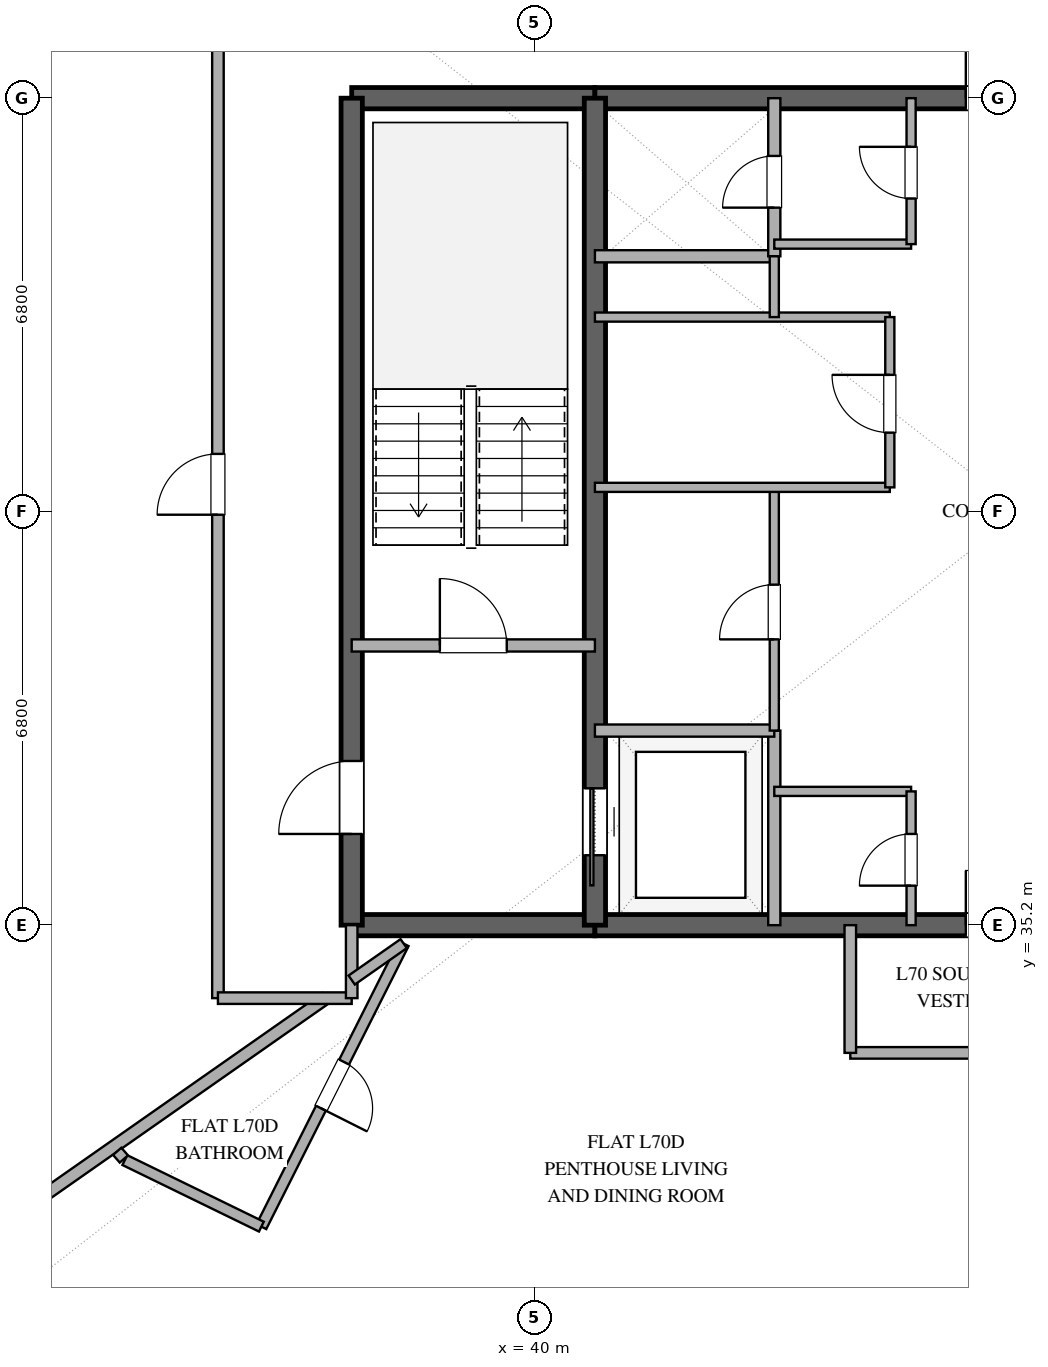
"""IFC4 building model, lengths in metres.
Left out: names, types, materials, properties, quantities, classifications, styles, units other than length and angle.
Written with IfcOpenShell. Run it as: python <this file> out.ifc"""

import sys

from ifc_helpers import new_model, si_unit, direction, frame, frame_2d, origin, place, context, subcontext, project, spatial, rectangle, extrude, element, fill, save


model = new_model("IFC4")
c1 = context("Model", 3, precision=1e-05, world=origin(), true_north=direction((0.0, 1.0)))
c2 = subcontext(c1, "Body", "Model", "MODEL_VIEW")
j1 = project(units=[si_unit("LENGTHUNIT", "METRE"), si_unit("PLANEANGLEUNIT", "RADIAN")], contexts=[c1])
p1 = place(None, origin())
s1 = spatial("IfcSite", under=j1, at=p1, CompositionType="ELEMENT")
p2 = place(p1, origin())
s2 = spatial("IfcBuilding", under=s1, at=p2, CompositionType="ELEMENT")
p3 = place(p2, frame((0.0, 0.0, 273.0)))
s3 = spatial("IfcBuildingStorey", under=s2, at=p3, CompositionType="ELEMENT", Elevation=273.0)
p4 = place(p3, frame((37.0, 35.2, 0.0), z_axis=(0.0, 0.0, 1.0), x_axis=(1.0, 0.0, 0.0)))
e1 = element("IfcWall", 1, at=p4, inside=s3, PredefinedType="SHEAR", context=c2, shape_type="SweptSolid", body=[
    extrude(rectangle(XDim=4.0, YDim=0.35, at=frame_2d((2.0, 0.0))), origin(), (0.0, 0.0, 1.0), 3.37),
])
p5 = place(p3, frame((41.0, 35.2, 0.0), z_axis=(0.0, 0.0, 1.0), x_axis=(1.0, 0.0, 0.0)))
e2 = element("IfcWall", 2, at=p5, inside=s3, PredefinedType="SHEAR", context=c2, shape_type="SweptSolid", body=[
    extrude(rectangle(XDim=14.0, YDim=0.35, at=frame_2d((7.0, 0.0))), origin(), (0.0, 0.0, 1.0), 3.37),
])
p6 = place(p5, frame((6.1, 0.0, 0.0)))
e3 = element("IfcOpeningElement", 3, at=p6, cuts=e2, PredefinedType="OPENING", context=c2, shape_type="SweptSolid", body=[
    extrude(rectangle(XDim=1.8, YDim=2.25, at=frame_2d((0.9, 1.125))), frame((0.0, 0.185, 0.0), z_axis=(0.0, -1.0, 0.0), x_axis=(1.0, 0.0, 0.0)), (0.0, 0.0, 1.0), 0.37),
])
p7 = place(p3, frame((37.0, 48.8, 0.0), z_axis=(0.0, 0.0, 1.0), x_axis=(1.0, 0.0, 0.0)))
e4 = element("IfcWall", 4, at=p7, inside=s3, PredefinedType="SHEAR", context=c2, shape_type="SweptSolid", body=[
    extrude(rectangle(XDim=4.0, YDim=0.35, at=frame_2d((2.0, 0.0))), origin(), (0.0, 0.0, 1.0), 3.37),
])
p8 = place(p3, frame((41.0, 48.8, 0.0), z_axis=(0.0, 0.0, 1.0), x_axis=(1.0, 0.0, 0.0)))
e5 = element("IfcWall", 5, at=p8, inside=s3, PredefinedType="SHEAR", context=c2, shape_type="SweptSolid", body=[
    extrude(rectangle(XDim=14.0, YDim=0.35, at=frame_2d((7.0, 0.0))), origin(), (0.0, 0.0, 1.0), 3.37),
])
p9 = place(p8, frame((6.1, 0.0, 0.0)))
e6 = element("IfcOpeningElement", 6, at=p9, cuts=e5, PredefinedType="OPENING", context=c2, shape_type="SweptSolid", body=[
    extrude(rectangle(XDim=1.8, YDim=2.25, at=frame_2d((0.9, 1.125))), frame((0.0, 0.185, 0.0), z_axis=(0.0, -1.0, 0.0), x_axis=(1.0, 0.0, 0.0)), (0.0, 0.0, 1.0), 0.37),
])
p10 = place(p3, frame((37.0, 35.2, 0.0), z_axis=(0.0, 0.0, 1.0), x_axis=(0.0, 1.0, 0.0)))
e7 = element("IfcWall", 7, at=p10, inside=s3, PredefinedType="SHEAR", context=c2, shape_type="SweptSolid", body=[
    extrude(rectangle(XDim=13.6, YDim=0.35, at=frame_2d((6.8, 0.0))), origin(), (0.0, 0.0, 1.0), 3.37),
])
p11 = place(p10, frame((1.5, 0.0, 0.0)))
e8 = element("IfcOpeningElement", 8, at=p11, cuts=e7, PredefinedType="OPENING", context=c2, shape_type="SweptSolid", body=[
    extrude(rectangle(XDim=1.2, YDim=2.15, at=frame_2d((0.6, 1.075))), frame((0.0, 0.185, 0.0), z_axis=(0.0, -1.0, 0.0), x_axis=(1.0, 0.0, 0.0)), (0.0, 0.0, 1.0), 0.37),
])
p12 = place(p3, frame((41.0, 35.2, 0.0), z_axis=(0.0, 0.0, 1.0), x_axis=(0.0, 1.0, 0.0)))
e9 = element("IfcWall", 9, at=p12, inside=s3, PredefinedType="SHEAR", context=c2, shape_type="SweptSolid", body=[
    extrude(rectangle(XDim=13.6, YDim=0.35, at=frame_2d((6.8, 0.0))), origin(), (0.0, 0.0, 1.0), 3.37),
])
p13 = place(p12, frame((1.15, 0.0, 0.0)))
e10 = element("IfcOpeningElement", 10, at=p13, cuts=e9, PredefinedType="OPENING", context=c2, shape_type="SweptSolid", body=[
    extrude(rectangle(XDim=1.1, YDim=2.2, at=frame_2d((0.55, 1.1))), frame((0.0, 0.185, 0.0), z_axis=(0.0, -1.0, 0.0), x_axis=(1.0, 0.0, 0.0)), (0.0, 0.0, 1.0), 0.37),
])
p14 = place(p3, frame((37.0, 39.8, 0.0), z_axis=(0.0, 0.0, 1.0), x_axis=(1.0, 0.0, 0.0)))
e11 = element("IfcWall", 11, at=p14, inside=s3, PredefinedType="SOLIDWALL", context=c2, shape_type="SweptSolid", body=[
    extrude(rectangle(XDim=4.0, YDim=0.2, at=frame_2d((2.0, 0.0))), origin(), (0.0, 0.0, 1.0), 2.73),
])
p15 = place(p14, frame((1.45, 0.0, 0.0)))
e12 = element("IfcOpeningElement", 12, at=p15, cuts=e11, PredefinedType="OPENING", context=c2, shape_type="SweptSolid", body=[
    extrude(rectangle(XDim=1.1, YDim=2.15, at=frame_2d((0.55, 1.075))), frame((0.0, 0.11, 0.0), z_axis=(0.0, -1.0, 0.0), x_axis=(1.0, 0.0, 0.0)), (0.0, 0.0, 1.0), 0.22),
])
p16 = place(p3, frame((43.95, 35.2, 0.0), z_axis=(0.0, 0.0, 1.0), x_axis=(0.0, 1.0, 0.0)))
e13 = element("IfcWall", 13, at=p16, inside=s3, PredefinedType="SOLIDWALL", context=c2, shape_type="SweptSolid", body=[
    extrude(rectangle(XDim=3.2, YDim=0.2, at=frame_2d((1.6, 0.0))), origin(), (0.0, 0.0, 1.0), 2.73),
])
for number, where, z_axis, x_axis in (
    (14, (41.0, 38.4, 0.0), (0.0, 0.0, 1.0), (1.0, 0.0, 0.0)),
    (15, (41.0, 46.2, 0.0), (0.0, 0.0, 1.0), (1.0, 0.0, 0.0)),
):
    element("IfcWall", number, at=place(p3, frame(where, z_axis=z_axis, x_axis=x_axis)), inside=s3, PredefinedType="SOLIDWALL", context=c2, shape_type="SweptSolid", body=[
        extrude(rectangle(XDim=2.95, YDim=0.2, at=frame_2d((1.475, 0.0))), origin(), (0.0, 0.0, 1.0), 2.73),
    ])
p17 = place(p3, frame((43.95, 46.2, 0.0), z_axis=(0.0, 0.0, 1.0), x_axis=(0.0, 1.0, 0.0)))
e16 = element("IfcWall", 16, at=p17, inside=s3, PredefinedType="SOLIDWALL", context=c2, shape_type="SweptSolid", body=[
    extrude(rectangle(XDim=2.6, YDim=0.2, at=frame_2d((1.3, 0.0))), origin(), (0.0, 0.0, 1.0), 2.73),
])
p18 = place(p17, frame((0.8, 0.0, 0.0)))
e17 = element("IfcOpeningElement", 17, at=p18, cuts=e16, PredefinedType="OPENING", context=c2, shape_type="SweptSolid", body=[
    extrude(rectangle(XDim=0.85, YDim=2.15, at=frame_2d((0.425, 1.075))), frame((0.0, 0.11, 0.0), z_axis=(0.0, -1.0, 0.0), x_axis=(1.0, 0.0, 0.0)), (0.0, 0.0, 1.0), 0.22),
])
p19 = place(p3, frame((43.95, 38.4, 0.0), z_axis=(0.0, 0.0, 1.0), x_axis=(0.0, 1.0, 0.0)))
e18 = element("IfcWall", 18, at=p19, inside=s3, PredefinedType="PARTITIONING", context=c2, shape_type="SweptSolid", body=[
    extrude(rectangle(XDim=4.0, YDim=0.15, at=frame_2d((2.0, 0.0))), origin(), (0.0, 0.0, 1.0), 2.73),
])
p20 = place(p19, frame((1.5, 0.0, 0.0)))
e19 = element("IfcOpeningElement", 19, at=p20, cuts=e18, PredefinedType="OPENING", context=c2, shape_type="SweptSolid", body=[
    extrude(rectangle(XDim=0.9, YDim=2.15, at=frame_2d((0.45, 1.075))), frame((0.0, 0.085, 0.0), z_axis=(0.0, -1.0, 0.0), x_axis=(1.0, 0.0, 0.0)), (0.0, 0.0, 1.0), 0.17),
])
for number, where, z_axis, x_axis in (
    (20, (41.0, 42.4, 0.0), (0.0, 0.0, 1.0), (1.0, 0.0, 0.0)),
    (21, (41.0, 45.2, 0.0), (0.0, 0.0, 1.0), (1.0, 0.0, 0.0)),
):
    element("IfcWall", number, at=place(p3, frame(where, z_axis=z_axis, x_axis=x_axis)), inside=s3, PredefinedType="PARTITIONING", context=c2, shape_type="SweptSolid", body=[
        extrude(rectangle(XDim=4.85, YDim=0.15, at=frame_2d((2.425, 0.0))), origin(), (0.0, 0.0, 1.0), 2.73),
    ])
p21 = place(p3, frame((43.95, 45.2, 0.0), z_axis=(0.0, 0.0, 1.0), x_axis=(0.0, 1.0, 0.0)))
e22 = element("IfcWall", 22, at=p21, inside=s3, PredefinedType="PARTITIONING", context=c2, shape_type="SweptSolid", body=[
    extrude(rectangle(XDim=1.0, YDim=0.15, at=frame_2d((0.5, 0.0))), origin(), (0.0, 0.0, 1.0), 2.73),
])
p22 = place(p3, frame((45.85, 42.4, 0.0), z_axis=(0.0, 0.0, 1.0), x_axis=(0.0, 1.0, 0.0)))
e23 = element("IfcWall", 23, at=p22, inside=s3, PredefinedType="PARTITIONING", context=c2, shape_type="SweptSolid", body=[
    extrude(rectangle(XDim=2.8, YDim=0.15, at=frame_2d((1.4, 0.0))), origin(), (0.0, 0.0, 1.0), 2.73),
])
p23 = place(p22, frame((0.9, 0.0, 0.0)))
e24 = element("IfcOpeningElement", 24, at=p23, cuts=e23, PredefinedType="OPENING", context=c2, shape_type="SweptSolid", body=[
    extrude(rectangle(XDim=0.95, YDim=2.15, at=frame_2d((0.475, 1.075))), frame((0.0, 0.085, 0.0), z_axis=(0.0, -1.0, 0.0), x_axis=(1.0, 0.0, 0.0)), (0.0, 0.0, 1.0), 0.17),
])
p24 = place(p3, frame((43.95, 37.4, 0.0), z_axis=(0.0, 0.0, 1.0), x_axis=(1.0, 0.0, 0.0)))
e25 = element("IfcWall", 25, at=p24, inside=s3, PredefinedType="PARTITIONING", context=c2, shape_type="SweptSolid", body=[
    extrude(rectangle(XDim=2.25, YDim=0.15, at=frame_2d((1.125, 0.0))), origin(), (0.0, 0.0, 1.0), 2.73),
])
p25 = place(p3, frame((46.2, 35.2, 0.0), z_axis=(0.0, 0.0, 1.0), x_axis=(0.0, 1.0, 0.0)))
e26 = element("IfcWall", 26, at=p25, inside=s3, PredefinedType="PARTITIONING", context=c2, shape_type="SweptSolid", body=[
    extrude(rectangle(XDim=2.2, YDim=0.15, at=frame_2d((1.1, 0.0))), origin(), (0.0, 0.0, 1.0), 2.73),
])
p26 = place(p25, frame((0.65, 0.0, 0.0)))
e27 = element("IfcOpeningElement", 27, at=p26, cuts=e26, PredefinedType="OPENING", context=c2, shape_type="SweptSolid", body=[
    extrude(rectangle(XDim=0.85, YDim=2.15, at=frame_2d((0.425, 1.075))), frame((0.0, 0.085, 0.0), z_axis=(0.0, -1.0, 0.0), x_axis=(1.0, 0.0, 0.0)), (0.0, 0.0, 1.0), 0.17),
])
p27 = place(p3, frame((43.95, 46.4, 0.0), z_axis=(0.0, 0.0, 1.0), x_axis=(1.0, 0.0, 0.0)))
e28 = element("IfcWall", 28, at=p27, inside=s3, PredefinedType="PARTITIONING", context=c2, shape_type="SweptSolid", body=[
    extrude(rectangle(XDim=2.25, YDim=0.15, at=frame_2d((1.125, 0.0))), origin(), (0.0, 0.0, 1.0), 2.73),
])
p28 = place(p3, frame((46.2, 46.4, 0.0), z_axis=(0.0, 0.0, 1.0), x_axis=(0.0, 1.0, 0.0)))
e29 = element("IfcWall", 29, at=p28, inside=s3, PredefinedType="PARTITIONING", context=c2, shape_type="SweptSolid", body=[
    extrude(rectangle(XDim=2.4, YDim=0.15, at=frame_2d((1.2, 0.0))), origin(), (0.0, 0.0, 1.0), 2.73),
])
p29 = place(p28, frame((0.75, 0.0, 0.0)))
e30 = element("IfcOpeningElement", 30, at=p29, cuts=e29, PredefinedType="OPENING", context=c2, shape_type="SweptSolid", body=[
    extrude(rectangle(XDim=0.85, YDim=2.15, at=frame_2d((0.425, 1.075))), frame((0.0, 0.085, 0.0), z_axis=(0.0, -1.0, 0.0), x_axis=(1.0, 0.0, 0.0)), (0.0, 0.0, 1.0), 0.17),
])
p30 = place(p3, frame((34.8, 34.0, 0.0), z_axis=(0.0, 0.0, 1.0), x_axis=(0.0, 1.0, 0.0)))
e31 = element("IfcWall", 31, at=p30, inside=s3, PredefinedType="PARTITIONING", context=c2, shape_type="SweptSolid", body=[
    extrude(rectangle(XDim=16.9, YDim=0.19, at=frame_2d((8.45, 0.0))), origin(), (0.0, 0.0, 1.0), 2.73),
])
p31 = place(p30, frame((7.95, 0.0, 0.0)))
e32 = element("IfcOpeningElement", 32, at=p31, cuts=e31, PredefinedType="OPENING", context=c2, shape_type="SweptSolid", body=[
    extrude(rectangle(XDim=1.0, YDim=2.2, at=frame_2d((0.5, 1.1))), frame((0.0, 0.105, 0.0), z_axis=(0.0, -1.0, 0.0), x_axis=(1.0, 0.0, 0.0)), (0.0, 0.0, 1.0), 0.21),
])
p32 = place(p3, frame((50.8, 33.1, 0.0), z_axis=(0.0, 0.0, 1.0), x_axis=(-1.0, 0.0, 0.0)))
e33 = element("IfcWall", 33, at=p32, inside=s3, PredefinedType="PARTITIONING", context=c2, shape_type="SweptSolid", body=[
    extrude(rectangle(XDim=5.6, YDim=0.19, at=frame_2d((2.8, 0.0))), origin(), (0.0, 0.0, 1.0), 2.73),
])
p33 = place(p32, frame((2.3, 0.0, 0.0)))
e34 = element("IfcOpeningElement", 34, at=p33, cuts=e33, PredefinedType="OPENING", context=c2, shape_type="SweptSolid", body=[
    extrude(rectangle(XDim=1.0, YDim=2.2, at=frame_2d((0.5, 1.1))), frame((0.0, 0.105, 0.0), z_axis=(0.0, -1.0, 0.0), x_axis=(1.0, 0.0, 0.0)), (0.0, 0.0, 1.0), 0.21),
])
p34 = place(p3, frame((37.855, 34.896, 0.0), z_axis=(0.0, 0.0, 1.0), x_axis=(-0.449274589412, -0.893393722447, 0.0)))
e35 = element("IfcWall", 35, at=p34, inside=s3, PredefinedType="PLUMBINGWALL", context=c2, shape_type="SweptSolid", body=[
    extrude(rectangle(XDim=5.209, YDim=0.18, at=frame_2d((2.604, 0.0))), origin(), (0.0, 0.0, 1.0), 2.73),
])
p35 = place(p34, frame((2.18, 0.0, 0.0)))
e36 = element("IfcOpeningElement", 36, at=p35, cuts=e35, PredefinedType="OPENING", context=c2, shape_type="SweptSolid", body=[
    extrude(rectangle(XDim=0.85, YDim=2.1, at=frame_2d((0.425, 1.05))), frame((0.0, 0.1, 0.0), z_axis=(0.0, -1.0, 0.0), x_axis=(1.0, 0.0, 0.0)), (0.0, 0.0, 1.0), 0.2),
])
p36 = place(p3, frame((36.575, 34.0, 0.0), z_axis=(0.0, 0.0, 1.0), x_axis=(-0.819138444565, -0.57359585828, 0.0)))
e37 = element("IfcWall", 37, at=p36, inside=s3, PredefinedType="PARTITIONING", context=c2, shape_type="SweptSolid", body=[
    extrude(rectangle(XDim=9.326, YDim=0.2, at=frame_2d((4.663, 0.0))), origin(), (0.0, 0.0, 1.0), 2.73),
])
p37 = place(p3, frame((35.514, 30.242, 0.0), z_axis=(0.0, 0.0, 1.0), x_axis=(-0.898915857852, 0.438121307975, 0.0)))
e38 = element("IfcWall", 38, at=p37, inside=s3, PredefinedType="PLUMBINGWALL", context=c2, shape_type="SweptSolid", body=[
    extrude(rectangle(XDim=2.498, YDim=0.18, at=frame_2d((1.249, 0.0))), origin(), (0.0, 0.0, 1.0), 2.73),
])
p38 = place(p3, frame((45.2, 33.1, 0.0), z_axis=(0.0, 0.0, 1.0), x_axis=(0.0, 1.0, 0.0)))
e39 = element("IfcWall", 39, at=p38, inside=s3, PredefinedType="PARTITIONING", context=c2, shape_type="SweptSolid", body=[
    extrude(rectangle(XDim=2.1, YDim=0.19, at=frame_2d((1.05, 0.0))), origin(), (0.0, 0.0, 1.0), 2.73),
])
p39 = place(p3, frame((37.0, 34.0, 0.0), z_axis=(0.0, 0.0, 1.0), x_axis=(-1.0, 0.0, 0.0)))
e40 = element("IfcWall", 40, at=p39, inside=s3, PredefinedType="PARTITIONING", context=c2, shape_type="SweptSolid", body=[
    extrude(rectangle(XDim=2.2, YDim=0.19, at=frame_2d((1.1, 0.0))), origin(), (0.0, 0.0, 1.0), 2.73),
])
p40 = place(p3, frame((37.0, 35.2, 0.0), z_axis=(0.0, 0.0, 1.0), x_axis=(0.0, -1.0, 0.0)))
e41 = element("IfcWall", 41, at=p40, inside=s3, PredefinedType="PARTITIONING", context=c2, shape_type="SweptSolid", body=[
    extrude(rectangle(XDim=1.2, YDim=0.19, at=frame_2d((0.6, 0.0))), origin(), (0.0, 0.0, 1.0), 2.73),
])
p41 = place(p3, frame((37.0, 34.298, 0.0), z_axis=(0.0, 0.0, 1.0), x_axis=(0.81908900763, 0.573666451502, 0.0)))
e42 = element("IfcWall", 42, at=p41, inside=s3, PredefinedType="PLUMBINGWALL", context=c2, shape_type="SweptSolid", body=[
    extrude(rectangle(XDim=1.043, YDim=0.18, at=frame_2d((0.522, 0.0))), origin(), (0.0, 0.0, 1.0), 2.73),
])
p42 = place(p3, frame((33.253, 31.355, 0.0), z_axis=(0.0, 0.0, 1.0), x_axis=(-0.656323784366, 0.754479350331, 0.0)))
e43 = element("IfcWall", 43, at=p42, inside=s3, PredefinedType="PLUMBINGWALL", context=c2, shape_type="SweptSolid", body=[
    extrude(rectangle(XDim=0.167, YDim=0.18, at=frame_2d((0.083, 0.0))), origin(), (0.0, 0.0, 1.0), 2.73),
])
p43 = place(p13, origin())
e44 = element("IfcDoor", 44, at=p43, inside=s3, OperationType="SLIDING_TO_LEFT", PredefinedType="DOOR", context=c2, shape_type="SweptSolid", body=[
    extrude(rectangle(XDim=1.1, YDim=2.2, at=frame_2d((0.55, 1.1))), frame((0.0, 0.025, 0.0), z_axis=(0.0, -1.0, 0.0), x_axis=(1.0, 0.0, 0.0)), (0.0, 0.0, 1.0), 0.05),
])
fill(e10, e44)
p44 = place(p11, origin())
e45 = element("IfcDoor", 45, at=p44, inside=s3, OperationType="SINGLE_SWING_LEFT", PredefinedType="DOOR", context=c2, shape_type="SweptSolid", body=[
    extrude(rectangle(XDim=1.2, YDim=2.15, at=frame_2d((0.6, 1.075))), frame((0.0, 0.025, 0.0), z_axis=(0.0, -1.0, 0.0), x_axis=(1.0, 0.0, 0.0)), (0.0, 0.0, 1.0), 0.05),
])
fill(e8, e45)
p45 = place(p6, origin())
e46 = element("IfcDoor", 46, at=p45, inside=s3, OperationType="DOUBLE_DOOR_SINGLE_SWING", PredefinedType="DOOR", context=c2, shape_type="SweptSolid", body=[
    extrude(rectangle(XDim=1.8, YDim=2.25, at=frame_2d((0.9, 1.125))), frame((0.0, 0.025, 0.0), z_axis=(0.0, -1.0, 0.0), x_axis=(1.0, 0.0, 0.0)), (0.0, 0.0, 1.0), 0.05),
])
fill(e3, e46)
p46 = place(p9, origin())
e47 = element("IfcDoor", 47, at=p46, inside=s3, OperationType="DOUBLE_DOOR_SINGLE_SWING", PredefinedType="DOOR", context=c2, shape_type="SweptSolid", body=[
    extrude(rectangle(XDim=1.8, YDim=2.25, at=frame_2d((0.9, 1.125))), frame((0.0, 0.025, 0.0), z_axis=(0.0, -1.0, 0.0), x_axis=(1.0, 0.0, 0.0)), (0.0, 0.0, 1.0), 0.05),
])
fill(e6, e47)
p47 = place(p15, origin())
e48 = element("IfcDoor", 48, at=p47, inside=s3, OperationType="SINGLE_SWING_LEFT", PredefinedType="DOOR", context=c2, shape_type="SweptSolid", body=[
    extrude(rectangle(XDim=1.1, YDim=2.15, at=frame_2d((0.55, 1.075))), frame((0.0, 0.025, 0.0), z_axis=(0.0, -1.0, 0.0), x_axis=(1.0, 0.0, 0.0)), (0.0, 0.0, 1.0), 0.05),
])
fill(e12, e48)
p48 = place(p18, origin())
e49 = element("IfcDoor", 49, at=p48, inside=s3, OperationType="SINGLE_SWING_LEFT", PredefinedType="DOOR", context=c2, shape_type="SweptSolid", body=[
    extrude(rectangle(XDim=0.85, YDim=2.15, at=frame_2d((0.425, 1.075))), frame((0.0, 0.025, 0.0), z_axis=(0.0, -1.0, 0.0), x_axis=(1.0, 0.0, 0.0)), (0.0, 0.0, 1.0), 0.05),
])
fill(e17, e49)
p49 = place(p20, origin())
e50 = element("IfcDoor", 50, at=p49, inside=s3, OperationType="SINGLE_SWING_LEFT", PredefinedType="DOOR", context=c2, shape_type="SweptSolid", body=[
    extrude(rectangle(XDim=0.9, YDim=2.15, at=frame_2d((0.45, 1.075))), frame((0.0, 0.025, 0.0), z_axis=(0.0, -1.0, 0.0), x_axis=(1.0, 0.0, 0.0)), (0.0, 0.0, 1.0), 0.05),
])
fill(e19, e50)
p50 = place(p23, origin())
e51 = element("IfcDoor", 51, at=p50, inside=s3, OperationType="SINGLE_SWING_RIGHT", PredefinedType="DOOR", context=c2, shape_type="SweptSolid", body=[
    extrude(rectangle(XDim=0.95, YDim=2.15, at=frame_2d((0.475, 1.075))), frame((0.0, 0.025, 0.0), z_axis=(0.0, -1.0, 0.0), x_axis=(1.0, 0.0, 0.0)), (0.0, 0.0, 1.0), 0.05),
])
fill(e24, e51)
p51 = place(p26, origin())
e52 = element("IfcDoor", 52, at=p51, inside=s3, OperationType="SINGLE_SWING_LEFT", PredefinedType="DOOR", context=c2, shape_type="SweptSolid", body=[
    extrude(rectangle(XDim=0.85, YDim=2.15, at=frame_2d((0.425, 1.075))), frame((0.0, 0.025, 0.0), z_axis=(0.0, -1.0, 0.0), x_axis=(1.0, 0.0, 0.0)), (0.0, 0.0, 1.0), 0.05),
])
fill(e27, e52)
p52 = place(p29, origin())
e53 = element("IfcDoor", 53, at=p52, inside=s3, OperationType="SINGLE_SWING_RIGHT", PredefinedType="DOOR", context=c2, shape_type="SweptSolid", body=[
    extrude(rectangle(XDim=0.85, YDim=2.15, at=frame_2d((0.425, 1.075))), frame((0.0, 0.025, 0.0), z_axis=(0.0, -1.0, 0.0), x_axis=(1.0, 0.0, 0.0)), (0.0, 0.0, 1.0), 0.05),
])
fill(e30, e53)
p53 = place(p31, origin())
e54 = element("IfcDoor", 54, at=p53, inside=s3, OperationType="SINGLE_SWING_LEFT", PredefinedType="DOOR", context=c2, shape_type="SweptSolid", body=[
    extrude(rectangle(XDim=1.0, YDim=2.2, at=frame_2d((0.5, 1.1))), frame((0.0, 0.025, 0.0), z_axis=(0.0, -1.0, 0.0), x_axis=(1.0, 0.0, 0.0)), (0.0, 0.0, 1.0), 0.05),
])
fill(e32, e54)
p54 = place(p35, origin())
e55 = element("IfcDoor", 55, at=p54, inside=s3, OperationType="SINGLE_SWING_RIGHT", PredefinedType="DOOR", context=c2, shape_type="SweptSolid", body=[
    extrude(rectangle(XDim=0.85, YDim=2.1, at=frame_2d((0.425, 1.05))), frame((0.0, 0.025, 0.0), z_axis=(0.0, -1.0, 0.0), x_axis=(1.0, 0.0, 0.0)), (0.0, 0.0, 1.0), 0.05),
])
fill(e36, e55)
save(model, sys.argv[1])
